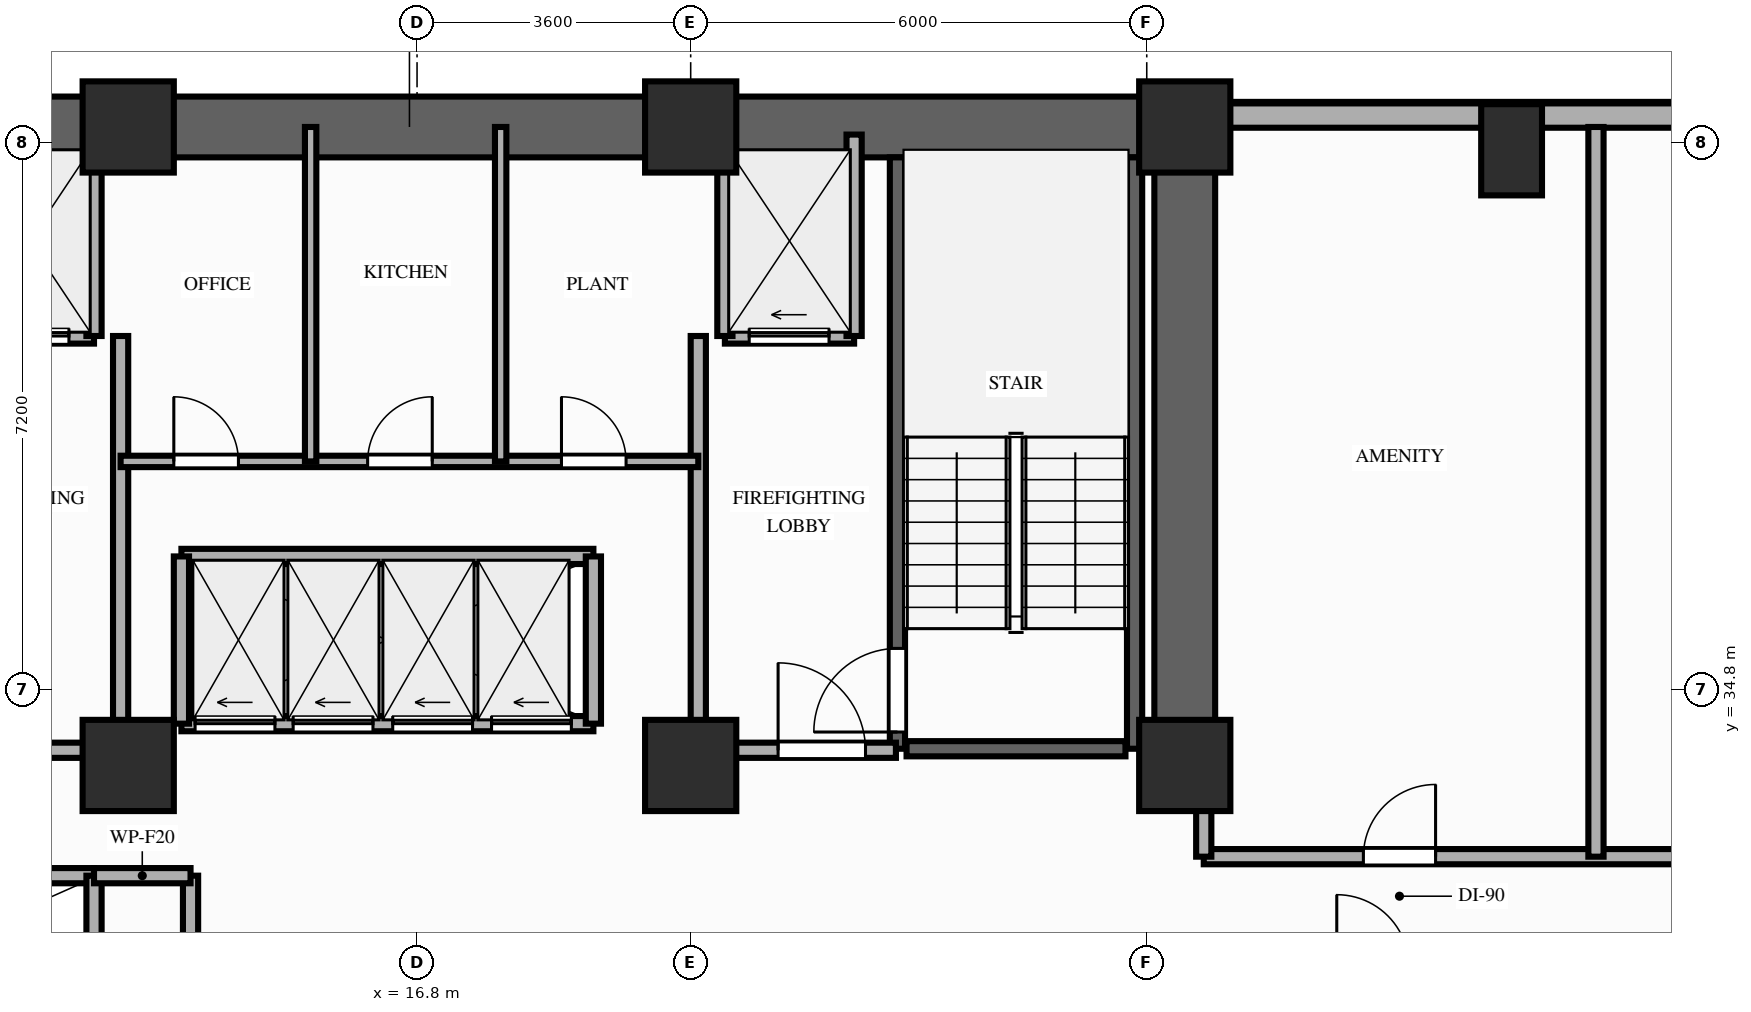
"""IFC4 building model, lengths in metres.
Left out: names, types, materials, properties, quantities, classifications, styles, units other than length and angle.
Written with IfcOpenShell. Run it as: python <this file> out.ifc"""

import sys

from ifc_helpers import new_model, si_unit, direction, frame, frame_2d, origin, origin_2d, place, context, subcontext, project, spatial, rectangle, extrude, element, fill, save


model = new_model("IFC4")
c1 = context("Model", 3, precision=1e-05, world=origin(), true_north=direction((0.0, 1.0)))
c2 = subcontext(c1, "Body", "Model", "MODEL_VIEW")
j1 = project(units=[si_unit("LENGTHUNIT", "METRE"), si_unit("PLANEANGLEUNIT", "RADIAN")], contexts=[c1])
p1 = place(None, origin())
s1 = spatial("IfcSite", under=j1, at=p1, CompositionType="ELEMENT")
p2 = place(p1, origin())
s2 = spatial("IfcBuilding", under=s1, at=p2, CompositionType="ELEMENT")
p3 = place(p2, frame((0.0, 0.0, 83.4)))
s3 = spatial("IfcBuildingStorey", under=s2, at=p3, CompositionType="ELEMENT", Elevation=83.4)
for number, where, z_axis, x_axis in (
    (1, (13.0, 33.8, 0.0), (0.0, 0.0, 1.0), (1.0, 0.0, 0.0)),
    (2, (20.4, 33.8, 0.0), (0.0, 0.0, 1.0), (1.0, 0.0, 0.0)),
    (3, (26.9, 33.8, 0.0), (0.0, 0.0, 1.0), (1.0, 0.0, 0.0)),
    (4, (13.0, 42.2, 0.0), (0.0, 0.0, 1.0), (1.0, 0.0, 0.0)),
    (5, (20.4, 42.2, 0.0), (0.0, 0.0, 1.0), (1.0, 0.0, 0.0)),
    (6, (26.9, 42.2, 0.0), (0.0, 0.0, 1.0), (1.0, 0.0, 0.0)),
):
    element("IfcColumn", number, at=place(p3, frame(where, z_axis=z_axis, x_axis=x_axis)), inside=s3, PredefinedType="COLUMN", context=c2, shape_type="SweptSolid", body=[
        extrude(rectangle(XDim=1.2, YDim=1.2, at=origin_2d()), origin(), (0.0, 0.0, 1.0), 3.2),
    ])
p4 = place(p3, frame((31.2, 41.9, 0.0), z_axis=(0.0, 0.0, 1.0), x_axis=(1.0, 0.0, 0.0)))
e7 = element("IfcColumn", 7, at=p4, inside=s3, PredefinedType="COLUMN", context=c2, shape_type="SweptSolid", body=[
    extrude(rectangle(XDim=0.8, YDim=1.2, at=origin_2d()), origin(), (0.0, 0.0, 1.0), 3.2),
])
p5 = place(p3, frame((46.4, 42.35, 0.0), z_axis=(0.0, 0.0, 1.0), x_axis=(-1.0, 0.0, 0.0)))
e8 = element("IfcWall", 8, at=p5, inside=s3, PredefinedType="STANDARD", context=c2, shape_type="SweptSolid", body=[
    extrude(rectangle(XDim=19.05, YDim=0.32, at=frame_2d((9.525, 0.0))), origin(), (0.0, 0.0, 1.0), 2.41),
])
p6 = place(p5, frame((8.79, 0.0, 0.85)))
e9 = element("IfcOpeningElement", 9, at=p6, cuts=e8, PredefinedType="OPENING", context=c2, shape_type="SweptSolid", body=[
    extrude(rectangle(XDim=1.8, YDim=1.31, at=frame_2d((0.9, 0.655))), frame((0.0, 0.17, 0.0), z_axis=(0.0, -1.0, 0.0), x_axis=(1.0, 0.0, 0.0)), (0.0, 0.0, 1.0), 0.34),
])
p7 = place(p3, frame((6.45, 42.2, 0.0), z_axis=(0.0, 0.0, 1.0), x_axis=(1.0, 0.0, 0.0)))
e10 = element("IfcWall", 10, at=p7, inside=s3, PredefinedType="SHEAR", context=c2, shape_type="SweptSolid", body=[
    extrude(rectangle(XDim=20.45, YDim=0.8, at=frame_2d((10.225, 0.0))), origin(), (0.0, 0.0, 1.0), 3.02),
])
p8 = place(p3, frame((26.9, 33.8, 0.0), z_axis=(0.0, 0.0, 1.0), x_axis=(0.0, 1.0, 0.0)))
e11 = element("IfcWall", 11, at=p8, inside=s3, PredefinedType="SHEAR", context=c2, shape_type="SweptSolid", body=[
    extrude(rectangle(XDim=7.95, YDim=0.8, at=frame_2d((3.975, 0.0))), origin(), (0.0, 0.0, 1.0), 3.02),
])
p9 = place(p3, frame((23.12, 34.02, 0.0), z_axis=(0.0, 0.0, 1.0), x_axis=(0.0, 1.0, 0.0)))
e12 = element("IfcWall", 12, at=p9, inside=s3, PredefinedType="SHEAR", context=c2, shape_type="SweptSolid", body=[
    extrude(rectangle(XDim=7.78, YDim=0.2, at=frame_2d((3.89, 0.0))), origin(), (0.0, 0.0, 1.0), 3.02),
])
p10 = place(p9, frame((0.22, 0.0, 0.0)))
e13 = element("IfcOpeningElement", 13, at=p10, cuts=e12, PredefinedType="OPENING", context=c2, shape_type="SweptSolid", body=[
    extrude(rectangle(XDim=1.1, YDim=2.15, at=frame_2d((0.55, 1.075))), frame((0.0, 0.11, 0.0), z_axis=(0.0, -1.0, 0.0), x_axis=(1.0, 0.0, 0.0)), (0.0, 0.0, 1.0), 0.22),
])
p11 = place(p3, frame((26.24, 34.02, 0.0), z_axis=(0.0, 0.0, 1.0), x_axis=(0.0, 1.0, 0.0)))
e14 = element("IfcWall", 14, at=p11, inside=s3, PredefinedType="SHEAR", context=c2, shape_type="SweptSolid", body=[
    extrude(rectangle(XDim=7.78, YDim=0.2, at=frame_2d((3.89, 0.0))), origin(), (0.0, 0.0, 1.0), 3.02),
])
p12 = place(p3, frame((23.24, 34.02, 0.0), z_axis=(0.0, 0.0, 1.0), x_axis=(1.0, 0.0, 0.0)))
e15 = element("IfcWall", 15, at=p12, inside=s3, PredefinedType="SHEAR", context=c2, shape_type="SweptSolid", body=[
    extrude(rectangle(XDim=2.88, YDim=0.2, at=frame_2d((1.44, 0.0))), origin(), (0.0, 0.0, 1.0), 3.02),
])
p13 = place(p3, frame((7.0, 32.35, 0.0), z_axis=(0.0, 0.0, 1.0), x_axis=(1.0, 0.0, 0.0)))
e16 = element("IfcWall", 16, at=p13, inside=s3, PredefinedType="MOVABLE", context=c2, shape_type="SweptSolid", body=[
    extrude(rectangle(XDim=5.55, YDim=0.2, at=frame_2d((2.775, 0.0))), origin(), (0.0, 0.0, 1.0), 3.02),
])
p14 = place(p3, frame((12.55, 29.85, 0.0), z_axis=(0.0, 0.0, 1.0), x_axis=(0.0, 1.0, 0.0)))
e17 = element("IfcWall", 17, at=p14, inside=s3, PredefinedType="MOVABLE", context=c2, shape_type="SweptSolid", body=[
    extrude(rectangle(XDim=2.5, YDim=0.2, at=frame_2d((1.25, 0.0))), origin(), (0.0, 0.0, 1.0), 3.02),
])
p15 = place(p3, frame((10.85, 39.45, 0.0), z_axis=(0.0, 0.0, 1.0), x_axis=(1.0, 0.0, 0.0)))
e18 = element("IfcWall", 18, at=p15, inside=s3, PredefinedType="MOVABLE", context=c2, shape_type="SweptSolid", body=[
    extrude(rectangle(XDim=1.7, YDim=0.2, at=frame_2d((0.85, 0.0))), origin(), (0.0, 0.0, 1.0), 3.02),
])
p16 = place(p15, frame((0.32, 0.0, 0.0)))
e19 = element("IfcOpeningElement", 19, at=p16, cuts=e18, PredefinedType="OPENING", context=c2, shape_type="SweptSolid", body=[
    extrude(rectangle(XDim=1.05, YDim=2.15, at=frame_2d((0.525, 1.075))), frame((0.0, 0.11, 0.0), z_axis=(0.0, -1.0, 0.0), x_axis=(1.0, 0.0, 0.0)), (0.0, 0.0, 1.0), 0.22),
])
p17 = place(p3, frame((20.85, 39.45, 0.0), z_axis=(0.0, 0.0, 1.0), x_axis=(1.0, 0.0, 0.0)))
e20 = element("IfcWall", 20, at=p17, inside=s3, PredefinedType="MOVABLE", context=c2, shape_type="SweptSolid", body=[
    extrude(rectangle(XDim=1.7, YDim=0.2, at=frame_2d((0.85, 0.0))), origin(), (0.0, 0.0, 1.0), 3.02),
])
p18 = place(p17, frame((0.32, 0.0, 0.0)))
e21 = element("IfcOpeningElement", 21, at=p18, cuts=e20, PredefinedType="OPENING", context=c2, shape_type="SweptSolid", body=[
    extrude(rectangle(XDim=1.05, YDim=2.15, at=frame_2d((0.525, 1.075))), frame((0.0, 0.11, 0.0), z_axis=(0.0, -1.0, 0.0), x_axis=(1.0, 0.0, 0.0)), (0.0, 0.0, 1.0), 0.22),
])
p19 = place(p3, frame((12.55, 39.45, 0.0), z_axis=(0.0, 0.0, 1.0), x_axis=(0.0, 1.0, 0.0)))
e22 = element("IfcWall", 22, at=p19, inside=s3, PredefinedType="MOVABLE", context=c2, shape_type="SweptSolid", body=[
    extrude(rectangle(XDim=2.65, YDim=0.2, at=frame_2d((1.325, 0.0))), origin(), (0.0, 0.0, 1.0), 2.41),
])
p20 = place(p3, frame((12.9, 34.0, 0.0), z_axis=(0.0, 0.0, 1.0), x_axis=(0.0, 1.0, 0.0)))
e23 = element("IfcWall", 23, at=p20, inside=s3, PredefinedType="PARTITIONING", context=c2, shape_type="SweptSolid", body=[
    extrude(rectangle(XDim=5.45, YDim=0.2, at=frame_2d((2.725, 0.0))), origin(), (0.0, 0.0, 1.0), 2.41),
])
p21 = place(p3, frame((10.24, 34.0, 0.0), z_axis=(0.0, 0.0, 1.0), x_axis=(1.0, 0.0, 0.0)))
e24 = element("IfcWall", 24, at=p21, inside=s3, PredefinedType="PARTITIONING", context=c2, shape_type="SweptSolid", body=[
    extrude(rectangle(XDim=2.66, YDim=0.2, at=frame_2d((1.33, 0.0))), origin(), (0.0, 0.0, 1.0), 2.41),
])
p22 = place(p21, frame((0.35, 0.0, 0.0)))
e25 = element("IfcOpeningElement", 25, at=p22, cuts=e24, PredefinedType="OPENING", context=c2, shape_type="SweptSolid", body=[
    extrude(rectangle(XDim=1.15, YDim=2.15, at=frame_2d((0.575, 1.075))), frame((0.0, 0.11, 0.0), z_axis=(0.0, -1.0, 0.0), x_axis=(1.0, 0.0, 0.0)), (0.0, 0.0, 1.0), 0.22),
])
for number, where, z_axis, x_axis in (
    (26, (20.85, 39.45, 0.0), (0.0, 0.0, 1.0), (0.0, 1.0, 0.0)),
    (27, (22.55, 39.45, 0.0), (0.0, 0.0, 1.0), (0.0, 1.0, 0.0)),
):
    element("IfcWall", number, at=place(p3, frame(where, z_axis=z_axis, x_axis=x_axis)), inside=s3, PredefinedType="MOVABLE", context=c2, shape_type="SweptSolid", body=[
        extrude(rectangle(XDim=2.65, YDim=0.2, at=frame_2d((1.325, 0.0))), origin(), (0.0, 0.0, 1.0), 2.41),
    ])
p23 = place(p3, frame((20.5, 34.0, 0.0), z_axis=(0.0, 0.0, 1.0), x_axis=(0.0, 1.0, 0.0)))
e28 = element("IfcWall", 28, at=p23, inside=s3, PredefinedType="PARTITIONING", context=c2, shape_type="SweptSolid", body=[
    extrude(rectangle(XDim=5.45, YDim=0.2, at=frame_2d((2.725, 0.0))), origin(), (0.0, 0.0, 1.0), 2.41),
])
p24 = place(p3, frame((20.5, 34.0, 0.0), z_axis=(0.0, 0.0, 1.0), x_axis=(1.0, 0.0, 0.0)))
e29 = element("IfcWall", 29, at=p24, inside=s3, PredefinedType="PARTITIONING", context=c2, shape_type="SweptSolid", body=[
    extrude(rectangle(XDim=2.6, YDim=0.2, at=frame_2d((1.3, 0.0))), origin(), (0.0, 0.0, 1.0), 2.41),
])
p25 = place(p24, frame((1.05, 0.0, 0.0)))
e30 = element("IfcOpeningElement", 30, at=p25, cuts=e29, PredefinedType="OPENING", context=c2, shape_type="SweptSolid", body=[
    extrude(rectangle(XDim=1.15, YDim=2.15, at=frame_2d((0.575, 1.075))), frame((0.0, 0.11, 0.0), z_axis=(0.0, -1.0, 0.0), x_axis=(1.0, 0.0, 0.0)), (0.0, 0.0, 1.0), 0.22),
])
p26 = place(p3, frame((13.82, 29.85, 0.0), z_axis=(0.0, 0.0, 1.0), x_axis=(0.0, 1.0, 0.0)))
e31 = element("IfcWall", 31, at=p26, inside=s3, PredefinedType="PARTITIONING", context=c2, shape_type="SweptSolid", body=[
    extrude(rectangle(XDim=2.5, YDim=0.2, at=frame_2d((1.25, 0.0))), origin(), (0.0, 0.0, 1.0), 3.02),
])
p27 = place(p3, frame((12.55, 32.35, 0.0), z_axis=(0.0, 0.0, 1.0), x_axis=(1.0, 0.0, 0.0)))
e32 = element("IfcWall", 32, at=p27, inside=s3, PredefinedType="PARTITIONING", context=c2, shape_type="SweptSolid", body=[
    extrude(rectangle(XDim=1.27, YDim=0.2, at=frame_2d((0.635, 0.0))), origin(), (0.0, 0.0, 1.0), 3.02),
])
p28 = place(p3, frame((12.9, 37.8, 0.0), z_axis=(0.0, 0.0, 1.0), x_axis=(1.0, 0.0, 0.0)))
e33 = element("IfcWall", 33, at=p28, inside=s3, PredefinedType="PARTITIONING", context=c2, shape_type="SweptSolid", body=[
    extrude(rectangle(XDim=7.6, YDim=0.15, at=frame_2d((3.8, 0.0))), origin(), (0.0, 0.0, 1.0), 3.02),
])
p29 = place(p28, frame((0.7, 0.0, 0.0)))
e34 = element("IfcOpeningElement", 34, at=p29, cuts=e33, PredefinedType="OPENING", context=c2, shape_type="SweptSolid", body=[
    extrude(rectangle(XDim=0.85, YDim=2.05, at=frame_2d((0.425, 1.025))), frame((0.0, 0.085, 0.0), z_axis=(0.0, -1.0, 0.0), x_axis=(1.0, 0.0, 0.0)), (0.0, 0.0, 1.0), 0.17),
])
p30 = place(p28, frame((3.25, 0.0, 0.0)))
e35 = element("IfcOpeningElement", 35, at=p30, cuts=e33, PredefinedType="OPENING", context=c2, shape_type="SweptSolid", body=[
    extrude(rectangle(XDim=0.85, YDim=2.05, at=frame_2d((0.425, 1.025))), frame((0.0, 0.085, 0.0), z_axis=(0.0, -1.0, 0.0), x_axis=(1.0, 0.0, 0.0)), (0.0, 0.0, 1.0), 0.17),
])
p31 = place(p28, frame((5.8, 0.0, 0.0)))
e36 = element("IfcOpeningElement", 36, at=p31, cuts=e33, PredefinedType="OPENING", context=c2, shape_type="SweptSolid", body=[
    extrude(rectangle(XDim=0.85, YDim=2.05, at=frame_2d((0.425, 1.025))), frame((0.0, 0.085, 0.0), z_axis=(0.0, -1.0, 0.0), x_axis=(1.0, 0.0, 0.0)), (0.0, 0.0, 1.0), 0.17),
])
for number, where, z_axis, x_axis in (
    (37, (15.4, 37.8, 0.0), (0.0, 0.0, 1.0), (0.0, 1.0, 0.0)),
    (38, (17.9, 37.8, 0.0), (0.0, 0.0, 1.0), (0.0, 1.0, 0.0)),
):
    element("IfcWall", number, at=place(p3, frame(where, z_axis=z_axis, x_axis=x_axis)), inside=s3, PredefinedType="PARTITIONING", context=c2, shape_type="SweptSolid", body=[
        extrude(rectangle(XDim=4.4, YDim=0.15, at=frame_2d((2.2, 0.0))), origin(), (0.0, 0.0, 1.0), 2.41),
    ])
p32 = place(p3, frame((13.7, 34.35, 0.0), z_axis=(0.0, 0.0, 1.0), x_axis=(1.0, 0.0, 0.0)))
e39 = element("IfcWall", 39, at=p32, inside=s3, PredefinedType="MOVABLE", context=c2, shape_type="SweptSolid", body=[
    extrude(rectangle(XDim=5.42, YDim=0.2, at=frame_2d((2.71, 0.0))), origin(), (0.0, 0.0, 1.0), 3.02),
])
p33 = place(p32, frame((0.18, 0.0, 0.0)))
e40 = element("IfcOpeningElement", 40, at=p33, cuts=e39, PredefinedType="OPENING", context=c2, shape_type="SweptSolid", body=[
    extrude(rectangle(XDim=1.05, YDim=2.15, at=frame_2d((0.525, 1.075))), frame((0.0, 0.11, 0.0), z_axis=(0.0, -1.0, 0.0), x_axis=(1.0, 0.0, 0.0)), (0.0, 0.0, 1.0), 0.22),
])
p34 = place(p32, frame((1.47, 0.0, 0.0)))
e41 = element("IfcOpeningElement", 41, at=p34, cuts=e39, PredefinedType="OPENING", context=c2, shape_type="SweptSolid", body=[
    extrude(rectangle(XDim=1.05, YDim=2.15, at=frame_2d((0.525, 1.075))), frame((0.0, 0.11, 0.0), z_axis=(0.0, -1.0, 0.0), x_axis=(1.0, 0.0, 0.0)), (0.0, 0.0, 1.0), 0.22),
])
p35 = place(p32, frame((2.78, 0.0, 0.0)))
e42 = element("IfcOpeningElement", 42, at=p35, cuts=e39, PredefinedType="OPENING", context=c2, shape_type="SweptSolid", body=[
    extrude(rectangle(XDim=1.05, YDim=2.15, at=frame_2d((0.525, 1.075))), frame((0.0, 0.11, 0.0), z_axis=(0.0, -1.0, 0.0), x_axis=(1.0, 0.0, 0.0)), (0.0, 0.0, 1.0), 0.22),
])
p36 = place(p32, frame((4.08, 0.0, 0.0)))
e43 = element("IfcOpeningElement", 43, at=p36, cuts=e39, PredefinedType="OPENING", context=c2, shape_type="SweptSolid", body=[
    extrude(rectangle(XDim=1.05, YDim=2.15, at=frame_2d((0.525, 1.075))), frame((0.0, 0.11, 0.0), z_axis=(0.0, -1.0, 0.0), x_axis=(1.0, 0.0, 0.0)), (0.0, 0.0, 1.0), 0.22),
])
p37 = place(p3, frame((13.7, 36.55, 0.0), z_axis=(0.0, 0.0, 1.0), x_axis=(1.0, 0.0, 0.0)))
e44 = element("IfcWall", 44, at=p37, inside=s3, PredefinedType="MOVABLE", context=c2, shape_type="SweptSolid", body=[
    extrude(rectangle(XDim=5.42, YDim=0.2, at=frame_2d((2.71, 0.0))), origin(), (0.0, 0.0, 1.0), 3.02),
])
for number, where, z_axis, x_axis in (
    (45, (13.7, 34.35, 0.0), (0.0, 0.0, 1.0), (0.0, 1.0, 0.0)),
    (46, (19.12, 34.35, 0.0), (0.0, 0.0, 1.0), (0.0, 1.0, 0.0)),
):
    element("IfcWall", number, at=place(p3, frame(where, z_axis=z_axis, x_axis=x_axis)), inside=s3, PredefinedType="MOVABLE", context=c2, shape_type="SweptSolid", body=[
        extrude(rectangle(XDim=2.2, YDim=0.2, at=frame_2d((1.1, 0.0))), origin(), (0.0, 0.0, 1.0), 3.02),
    ])
p38 = place(p3, frame((27.15, 32.6, 0.0), z_axis=(0.0, 0.0, 1.0), x_axis=(1.0, 0.0, 0.0)))
e47 = element("IfcWall", 47, at=p38, inside=s3, PredefinedType="PARTITIONING", context=c2, shape_type="SweptSolid", body=[
    extrude(rectangle(XDim=13.95, YDim=0.2, at=frame_2d((6.975, 0.0))), origin(), (0.0, 0.0, 1.0), 2.41),
])
p39 = place(p38, frame((2.1, 0.0, 0.0)))
e48 = element("IfcOpeningElement", 48, at=p39, cuts=e47, PredefinedType="OPENING", context=c2, shape_type="SweptSolid", body=[
    extrude(rectangle(XDim=0.95, YDim=2.15, at=frame_2d((0.475, 1.075))), frame((0.0, 0.11, 0.0), z_axis=(0.0, -1.0, 0.0), x_axis=(1.0, 0.0, 0.0)), (0.0, 0.0, 1.0), 0.22),
])
p40 = place(p38, frame((9.07, 0.0, 0.0)))
e49 = element("IfcOpeningElement", 49, at=p40, cuts=e47, PredefinedType="OPENING", context=c2, shape_type="SweptSolid", body=[
    extrude(rectangle(XDim=0.95, YDim=2.15, at=frame_2d((0.475, 1.075))), frame((0.0, 0.11, 0.0), z_axis=(0.0, -1.0, 0.0), x_axis=(1.0, 0.0, 0.0)), (0.0, 0.0, 1.0), 0.22),
])
p41 = place(p3, frame((27.15, 32.6, 0.0), z_axis=(0.0, 0.0, 1.0), x_axis=(0.0, 1.0, 0.0)))
e50 = element("IfcWall", 50, at=p41, inside=s3, PredefinedType="PARTITIONING", context=c2, shape_type="SweptSolid", body=[
    extrude(rectangle(XDim=1.08, YDim=0.2, at=frame_2d((0.54, 0.0))), origin(), (0.0, 0.0, 1.0), 2.41),
])
p42 = place(p3, frame((32.31, 32.6, 0.0), z_axis=(0.0, 0.0, 1.0), x_axis=(0.0, 1.0, 0.0)))
e51 = element("IfcWall", 51, at=p42, inside=s3, PredefinedType="PARTITIONING", context=c2, shape_type="SweptSolid", body=[
    extrude(rectangle(XDim=9.6, YDim=0.2, at=frame_2d((4.8, 0.0))), origin(), (0.0, 0.0, 1.0), 2.41),
])
p43 = place(p10, origin())
e52 = element("IfcDoor", 52, at=p43, inside=s3, OperationType="SINGLE_SWING_LEFT", PredefinedType="DOOR", context=c2, shape_type="SweptSolid", body=[
    extrude(rectangle(XDim=1.1, YDim=2.15, at=frame_2d((0.55, 1.075))), frame((0.0, 0.025, 0.0), z_axis=(0.0, -1.0, 0.0), x_axis=(1.0, 0.0, 0.0)), (0.0, 0.0, 1.0), 0.05),
])
fill(e13, e52)
p44 = place(p16, origin())
e53 = element("IfcDoor", 53, at=p44, inside=s3, OperationType="SLIDING_TO_LEFT", PredefinedType="DOOR", context=c2, shape_type="SweptSolid", body=[
    extrude(rectangle(XDim=1.05, YDim=2.15, at=frame_2d((0.525, 1.075))), frame((0.0, 0.025, 0.0), z_axis=(0.0, -1.0, 0.0), x_axis=(1.0, 0.0, 0.0)), (0.0, 0.0, 1.0), 0.05),
])
fill(e19, e53)
p45 = place(p18, origin())
e54 = element("IfcDoor", 54, at=p45, inside=s3, OperationType="SLIDING_TO_LEFT", PredefinedType="DOOR", context=c2, shape_type="SweptSolid", body=[
    extrude(rectangle(XDim=1.05, YDim=2.15, at=frame_2d((0.525, 1.075))), frame((0.0, 0.025, 0.0), z_axis=(0.0, -1.0, 0.0), x_axis=(1.0, 0.0, 0.0)), (0.0, 0.0, 1.0), 0.05),
])
fill(e21, e54)
p46 = place(p25, origin())
e55 = element("IfcDoor", 55, at=p46, inside=s3, OperationType="SINGLE_SWING_LEFT", PredefinedType="DOOR", context=c2, shape_type="SweptSolid", body=[
    extrude(rectangle(XDim=1.15, YDim=2.15, at=frame_2d((0.575, 1.075))), frame((0.0, 0.025, 0.0), z_axis=(0.0, -1.0, 0.0), x_axis=(1.0, 0.0, 0.0)), (0.0, 0.0, 1.0), 0.05),
])
fill(e30, e55)
p47 = place(p29, origin())
e56 = element("IfcDoor", 56, at=p47, inside=s3, OperationType="SINGLE_SWING_LEFT", PredefinedType="DOOR", context=c2, shape_type="SweptSolid", body=[
    extrude(rectangle(XDim=0.85, YDim=2.05, at=frame_2d((0.425, 1.025))), frame((0.0, 0.025, 0.0), z_axis=(0.0, -1.0, 0.0), x_axis=(1.0, 0.0, 0.0)), (0.0, 0.0, 1.0), 0.05),
])
fill(e34, e56)
p48 = place(p30, origin())
e57 = element("IfcDoor", 57, at=p48, inside=s3, OperationType="SINGLE_SWING_RIGHT", PredefinedType="DOOR", context=c2, shape_type="SweptSolid", body=[
    extrude(rectangle(XDim=0.85, YDim=2.05, at=frame_2d((0.425, 1.025))), frame((0.0, 0.025, 0.0), z_axis=(0.0, -1.0, 0.0), x_axis=(1.0, 0.0, 0.0)), (0.0, 0.0, 1.0), 0.05),
])
fill(e35, e57)
p49 = place(p31, origin())
e58 = element("IfcDoor", 58, at=p49, inside=s3, OperationType="SINGLE_SWING_LEFT", PredefinedType="DOOR", context=c2, shape_type="SweptSolid", body=[
    extrude(rectangle(XDim=0.85, YDim=2.05, at=frame_2d((0.425, 1.025))), frame((0.0, 0.025, 0.0), z_axis=(0.0, -1.0, 0.0), x_axis=(1.0, 0.0, 0.0)), (0.0, 0.0, 1.0), 0.05),
])
fill(e36, e58)
p50 = place(p33, origin())
e59 = element("IfcDoor", 59, at=p50, inside=s3, OperationType="SLIDING_TO_LEFT", PredefinedType="DOOR", context=c2, shape_type="SweptSolid", body=[
    extrude(rectangle(XDim=1.05, YDim=2.15, at=frame_2d((0.525, 1.075))), frame((0.0, 0.025, 0.0), z_axis=(0.0, -1.0, 0.0), x_axis=(1.0, 0.0, 0.0)), (0.0, 0.0, 1.0), 0.05),
])
fill(e40, e59)
p51 = place(p34, origin())
e60 = element("IfcDoor", 60, at=p51, inside=s3, OperationType="SLIDING_TO_LEFT", PredefinedType="DOOR", context=c2, shape_type="SweptSolid", body=[
    extrude(rectangle(XDim=1.05, YDim=2.15, at=frame_2d((0.525, 1.075))), frame((0.0, 0.025, 0.0), z_axis=(0.0, -1.0, 0.0), x_axis=(1.0, 0.0, 0.0)), (0.0, 0.0, 1.0), 0.05),
])
fill(e41, e60)
p52 = place(p35, origin())
e61 = element("IfcDoor", 61, at=p52, inside=s3, OperationType="SLIDING_TO_LEFT", PredefinedType="DOOR", context=c2, shape_type="SweptSolid", body=[
    extrude(rectangle(XDim=1.05, YDim=2.15, at=frame_2d((0.525, 1.075))), frame((0.0, 0.025, 0.0), z_axis=(0.0, -1.0, 0.0), x_axis=(1.0, 0.0, 0.0)), (0.0, 0.0, 1.0), 0.05),
])
fill(e42, e61)
p53 = place(p36, origin())
e62 = element("IfcDoor", 62, at=p53, inside=s3, OperationType="SLIDING_TO_LEFT", PredefinedType="DOOR", context=c2, shape_type="SweptSolid", body=[
    extrude(rectangle(XDim=1.05, YDim=2.15, at=frame_2d((0.525, 1.075))), frame((0.0, 0.025, 0.0), z_axis=(0.0, -1.0, 0.0), x_axis=(1.0, 0.0, 0.0)), (0.0, 0.0, 1.0), 0.05),
])
fill(e43, e62)
p54 = place(p39, origin())
e63 = element("IfcDoor", 63, at=p54, inside=s3, OperationType="SINGLE_SWING_RIGHT", PredefinedType="DOOR", context=c2, shape_type="SweptSolid", body=[
    extrude(rectangle(XDim=0.95, YDim=2.15, at=frame_2d((0.475, 1.075))), frame((0.0, 0.025, 0.0), z_axis=(0.0, -1.0, 0.0), x_axis=(1.0, 0.0, 0.0)), (0.0, 0.0, 1.0), 0.05),
])
fill(e48, e63)
save(model, sys.argv[1])
